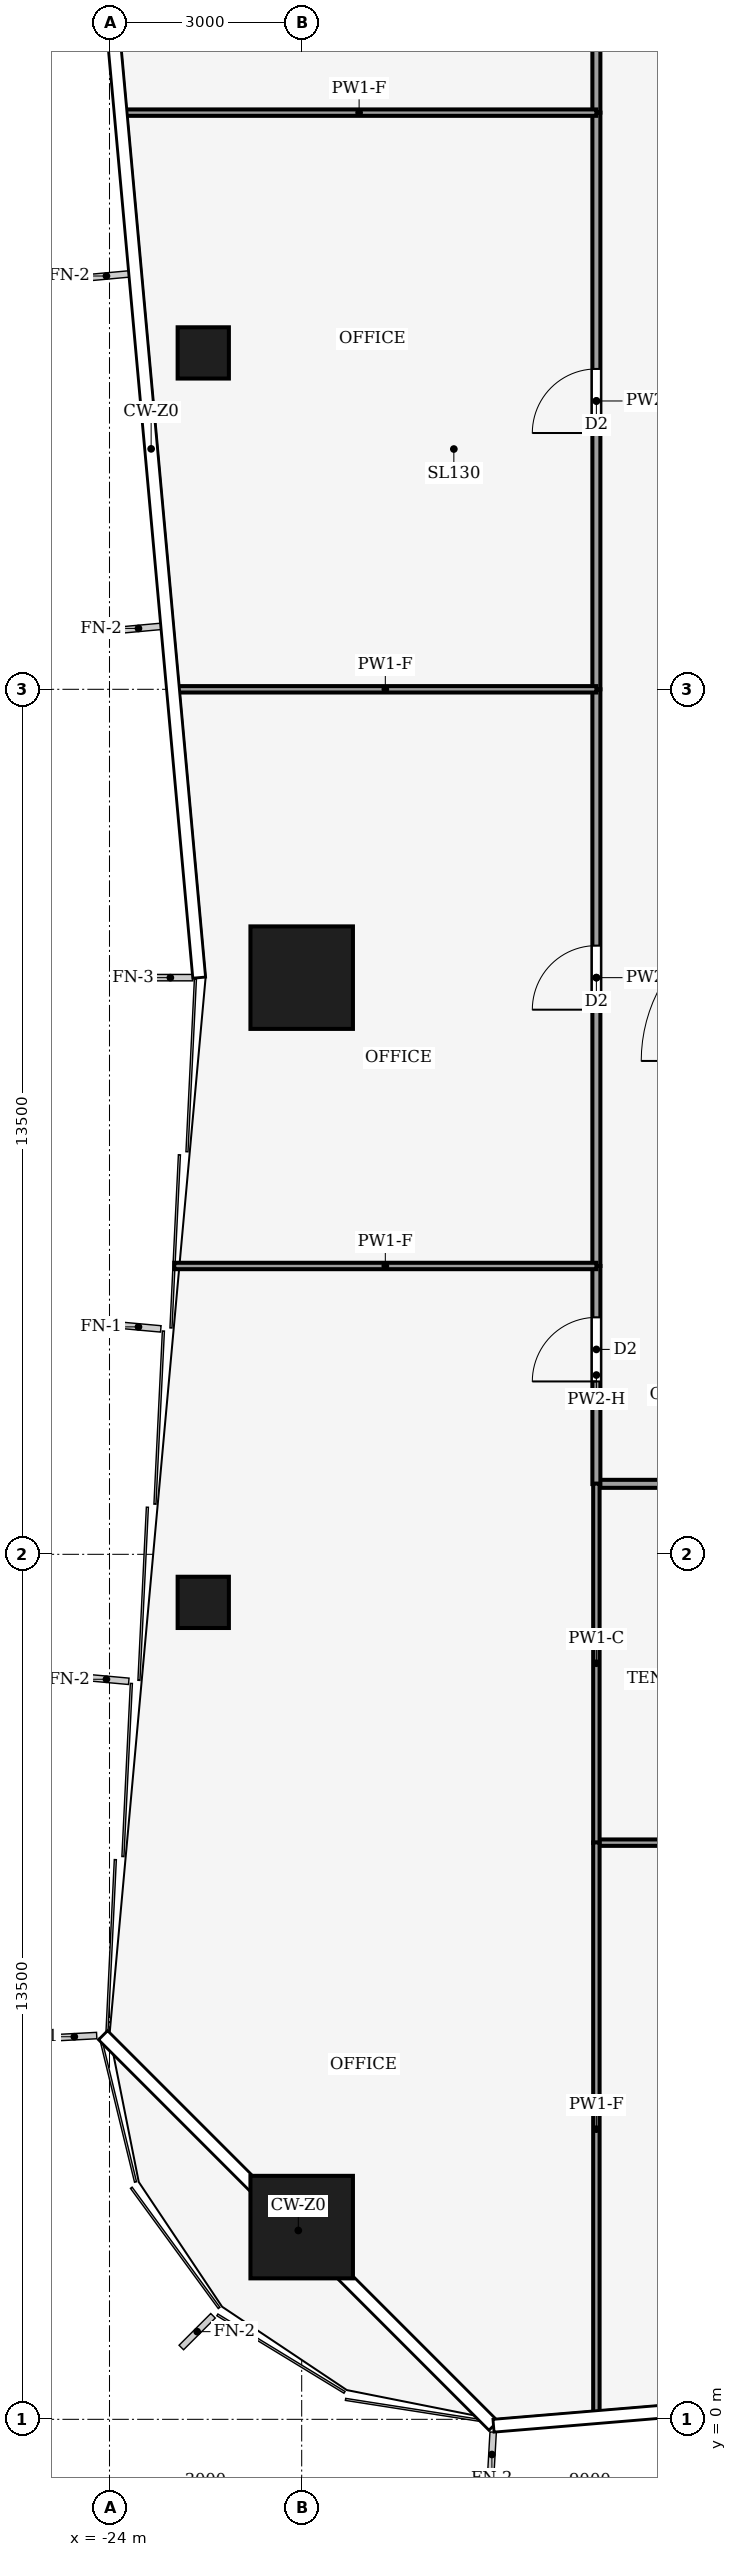
"""IFC4 building model, lengths in metres.
Left out: names, types, materials, properties, quantities, classifications, styles, units other than length and angle.
Written with IfcOpenShell. Run it as: python <this file> out.ifc"""

import sys

from ifc_helpers import new_model, si_unit, direction, frame, frame_2d, origin, origin_2d, place, context, subcontext, project, spatial, rectangle, hollow_rectangle, extrude, element, fill, save


model = new_model("IFC4")
c1 = context("Model", 3, precision=1e-05, world=origin(), true_north=direction((0.0, 1.0)))
c2 = subcontext(c1, "Body", "Model", "MODEL_VIEW")
j1 = project(units=[si_unit("LENGTHUNIT", "METRE"), si_unit("PLANEANGLEUNIT", "RADIAN")], contexts=[c1])
p1 = place(None, origin())
s1 = spatial("IfcSite", under=j1, at=p1, CompositionType="ELEMENT")
p2 = place(p1, origin())
s2 = spatial("IfcBuilding", under=s1, at=p2, CompositionType="ELEMENT")
p3 = place(p2, frame((0.0, 0.0, 50.0)))
s3 = spatial("IfcBuildingStorey", under=s2, at=p3, CompositionType="ELEMENT", Elevation=50.0)
for number, where, z_axis, x_axis in (
    (1, (-21.0, 3.0, 0.0), (0.0, 0.0, 1.0), (1.0, 0.0, 0.0)),
    (2, (-21.0, 22.5, 0.0), (0.0, 0.0, 1.0), (1.0, 0.0, 0.0)),
):
    element("IfcColumn", number, at=place(p3, frame(where, z_axis=z_axis, x_axis=x_axis)), inside=s3, PredefinedType="COLUMN", context=c2, shape_type="SweptSolid", body=[
        extrude(hollow_rectangle(XDim=1.6, YDim=1.6, WallThickness=0.09, at=origin_2d()), origin(), (0.0, 0.0, 1.0), 4.0),
    ])
for number, where, z_axis, x_axis in (
    (3, (-22.536, 12.75, 0.0), (0.0, 0.0, 1.0), (1.0, 0.0, 0.0)),
    (4, (-22.536, 32.25, 0.0), (0.0, 0.0, 1.0), (1.0, 0.0, 0.0)),
):
    element("IfcColumn", number, at=place(p3, frame(where, z_axis=z_axis, x_axis=x_axis)), inside=s3, PredefinedType="COLUMN", context=c2, shape_type="SweptSolid", body=[
        extrude(hollow_rectangle(XDim=0.8, YDim=0.8, WallThickness=0.04, at=origin_2d()), origin(), (0.0, 0.0, 1.0), 4.0),
    ])
p4 = place(p3, frame((-12.0, 14.6, 0.0), z_axis=(0.0, 0.0, 1.0), x_axis=(-1.0, 0.0, 0.0)))
e5 = element("IfcWall", 5, at=p4, inside=s3, PredefinedType="PARTITIONING", context=c2, shape_type="SweptSolid", body=[
    extrude(rectangle(XDim=4.4, YDim=0.125, at=frame_2d((2.2, 0.0))), origin(), (0.0, 0.0, 1.0), 3.29),
])
p5 = place(p4, frame((1.7, 0.0, 0.0)))
e6 = element("IfcOpeningElement", 6, at=p5, cuts=e5, PredefinedType="OPENING", context=c2, shape_type="SweptSolid", body=[
    extrude(rectangle(XDim=1.0, YDim=2.1, at=frame_2d((0.5, 1.05))), frame((0.0, 0.073, 0.0), z_axis=(0.0, -1.0, 0.0), x_axis=(1.0, 0.0, 0.0)), (0.0, 0.0, 1.0), 0.145),
])
p6 = place(p3, frame((-16.4, 14.596, 0.0), z_axis=(0.0, 0.0, 1.0), x_axis=(0.0, 1.0, 0.0)))
e7 = element("IfcWall", 7, at=p6, inside=s3, PredefinedType="PARTITIONING", context=c2, shape_type="SweptSolid", body=[
    extrude(rectangle(XDim=3.404, YDim=0.125, at=frame_2d((1.702, 0.0))), origin(), (0.0, 0.0, 1.0), 3.14),
])
p7 = place(p6, frame((1.602, 0.0, 0.0)))
e8 = element("IfcOpeningElement", 8, at=p7, cuts=e7, PredefinedType="OPENING", context=c2, shape_type="SweptSolid", body=[
    extrude(rectangle(XDim=1.0, YDim=2.1, at=frame_2d((0.5, 1.05))), frame((0.0, 0.073, 0.0), z_axis=(0.0, -1.0, 0.0), x_axis=(1.0, 0.0, 0.0)), (0.0, 0.0, 1.0), 0.145),
])
p8 = place(p3, frame((-16.4, 18.0, 0.0), z_axis=(0.0, 0.0, 1.0), x_axis=(0.0, 1.0, 0.0)))
e9 = element("IfcWall", 9, at=p8, inside=s3, PredefinedType="PARTITIONING", context=c2, shape_type="SweptSolid", body=[
    extrude(rectangle(XDim=9.0, YDim=0.125, at=frame_2d((4.5, 0.0))), origin(), (0.0, 0.0, 1.0), 3.48),
])
p9 = place(p8, frame((4.0, 0.0, 0.0)))
e10 = element("IfcOpeningElement", 10, at=p9, cuts=e9, PredefinedType="OPENING", context=c2, shape_type="SweptSolid", body=[
    extrude(rectangle(XDim=1.0, YDim=2.1, at=frame_2d((0.5, 1.05))), frame((0.0, 0.073, 0.0), z_axis=(0.0, -1.0, 0.0), x_axis=(1.0, 0.0, 0.0)), (0.0, 0.0, 1.0), 0.145),
])
p10 = place(p3, frame((-16.4, 27.0, 0.0), z_axis=(0.0, 0.0, 1.0), x_axis=(0.0, 1.0, 0.0)))
e11 = element("IfcWall", 11, at=p10, inside=s3, PredefinedType="PARTITIONING", context=c2, shape_type="SweptSolid", body=[
    extrude(rectangle(XDim=9.0, YDim=0.125, at=frame_2d((4.5, 0.0))), origin(), (0.0, 0.0, 1.0), 3.48),
])
p11 = place(p10, frame((4.0, 0.0, 0.0)))
e12 = element("IfcOpeningElement", 12, at=p11, cuts=e11, PredefinedType="OPENING", context=c2, shape_type="SweptSolid", body=[
    extrude(rectangle(XDim=1.0, YDim=2.1, at=frame_2d((0.5, 1.05))), frame((0.0, 0.073, 0.0), z_axis=(0.0, -1.0, 0.0), x_axis=(1.0, 0.0, 0.0)), (0.0, 0.0, 1.0), 0.145),
])
p12 = place(p3, frame((-16.4, 36.0, 0.0), z_axis=(0.0, 0.0, 1.0), x_axis=(0.0, 1.0, 0.0)))
e13 = element("IfcWall", 13, at=p12, inside=s3, PredefinedType="PARTITIONING", context=c2, shape_type="SweptSolid", body=[
    extrude(rectangle(XDim=5.404, YDim=0.125, at=frame_2d((2.702, 0.0))), origin(), (0.0, 0.0, 1.0), 3.14),
])
p13 = place(p12, frame((2.202, 0.0, 0.0)))
e14 = element("IfcOpeningElement", 14, at=p13, cuts=e13, PredefinedType="OPENING", context=c2, shape_type="SweptSolid", body=[
    extrude(rectangle(XDim=1.0, YDim=2.1, at=frame_2d((0.5, 1.05))), frame((0.0, 0.073, 0.0), z_axis=(0.0, -1.0, 0.0), x_axis=(1.0, 0.0, 0.0)), (0.0, 0.0, 1.0), 0.145),
])
p14 = place(p3, frame((-16.4, 9.0, 0.0), z_axis=(0.0, 0.0, 1.0), x_axis=(1.0, 0.0, 0.0)))
e15 = element("IfcWall", 15, at=p14, inside=s3, PredefinedType="PARTITIONING", context=c2, shape_type="SweptSolid", body=[
    extrude(rectangle(XDim=4.404, YDim=0.1, at=frame_2d((2.202, 0.0))), origin(), (0.0, 0.0, 1.0), 3.29),
])
p15 = place(p3, frame((-16.4, 14.604, 0.0), z_axis=(0.0, 0.0, 1.0), x_axis=(0.0, -1.0, 0.0)))
e16 = element("IfcWall", 16, at=p15, inside=s3, PredefinedType="PARTITIONING", context=c2, shape_type="SweptSolid", body=[
    extrude(rectangle(XDim=5.608, YDim=0.1, at=frame_2d((2.804, 0.0))), origin(), (0.0, 0.0, 1.0), 3.87),
])
p16 = place(p3, frame((-16.4, 9.004, 0.0), z_axis=(0.0, 0.0, 1.0), x_axis=(0.0, -1.0, 0.0)))
e17 = element("IfcWall", 17, at=p16, inside=s3, PredefinedType="PARTITIONING", context=c2, shape_type="SweptSolid", body=[
    extrude(rectangle(XDim=8.951, YDim=0.1, at=frame_2d((4.475, 0.0))), origin(), (0.0, 0.0, 1.0), 3.04),
])
for number, where, z_axis, x_axis in (
    (18, (-16.4, 18.0, 0.0), (0.0, 0.0, 1.0), (-1.0, 0.0, 0.0)),
    (19, (-16.4, 27.0, 0.0), (0.0, 0.0, 1.0), (-1.0, 0.0, 0.0)),
):
    element("IfcWall", number, at=place(p3, frame(where, z_axis=z_axis, x_axis=x_axis)), inside=s3, PredefinedType="PARTITIONING", context=c2, shape_type="SweptSolid", body=[
        extrude(rectangle(XDim=6.589, YDim=0.1, at=frame_2d((3.294, 0.0))), origin(), (0.0, 0.0, 1.0), 3.04),
    ])
p17 = place(p3, frame((-16.4, 36.0, 0.0), z_axis=(0.0, 0.0, 1.0), x_axis=(-1.0, 0.0, 0.0)))
e20 = element("IfcWall", 20, at=p17, inside=s3, PredefinedType="PARTITIONING", context=c2, shape_type="SweptSolid", body=[
    extrude(rectangle(XDim=7.407, YDim=0.1, at=frame_2d((3.704, 0.0))), origin(), (0.0, 0.0, 1.0), 3.04),
])
p18 = place(p7, origin())
e21 = element("IfcDoor", 21, at=p18, inside=s3, OperationType="SINGLE_SWING_RIGHT", PredefinedType="DOOR", context=c2, shape_type="SweptSolid", body=[
    extrude(rectangle(XDim=1.0, YDim=2.1, at=frame_2d((0.5, 1.05))), frame((0.0, 0.025, 0.0), z_axis=(0.0, -1.0, 0.0), x_axis=(1.0, 0.0, 0.0)), (0.0, 0.0, 1.0), 0.05),
])
fill(e8, e21)
p19 = place(p9, origin())
e22 = element("IfcDoor", 22, at=p19, inside=s3, OperationType="SINGLE_SWING_RIGHT", PredefinedType="DOOR", context=c2, shape_type="SweptSolid", body=[
    extrude(rectangle(XDim=1.0, YDim=2.1, at=frame_2d((0.5, 1.05))), frame((0.0, 0.025, 0.0), z_axis=(0.0, -1.0, 0.0), x_axis=(1.0, 0.0, 0.0)), (0.0, 0.0, 1.0), 0.05),
])
fill(e10, e22)
p20 = place(p11, origin())
e23 = element("IfcDoor", 23, at=p20, inside=s3, OperationType="SINGLE_SWING_LEFT", PredefinedType="DOOR", context=c2, shape_type="SweptSolid", body=[
    extrude(rectangle(XDim=1.0, YDim=2.1, at=frame_2d((0.5, 1.05))), frame((0.0, 0.025, 0.0), z_axis=(0.0, -1.0, 0.0), x_axis=(1.0, 0.0, 0.0)), (0.0, 0.0, 1.0), 0.05),
])
fill(e12, e23)
save(model, sys.argv[1])
